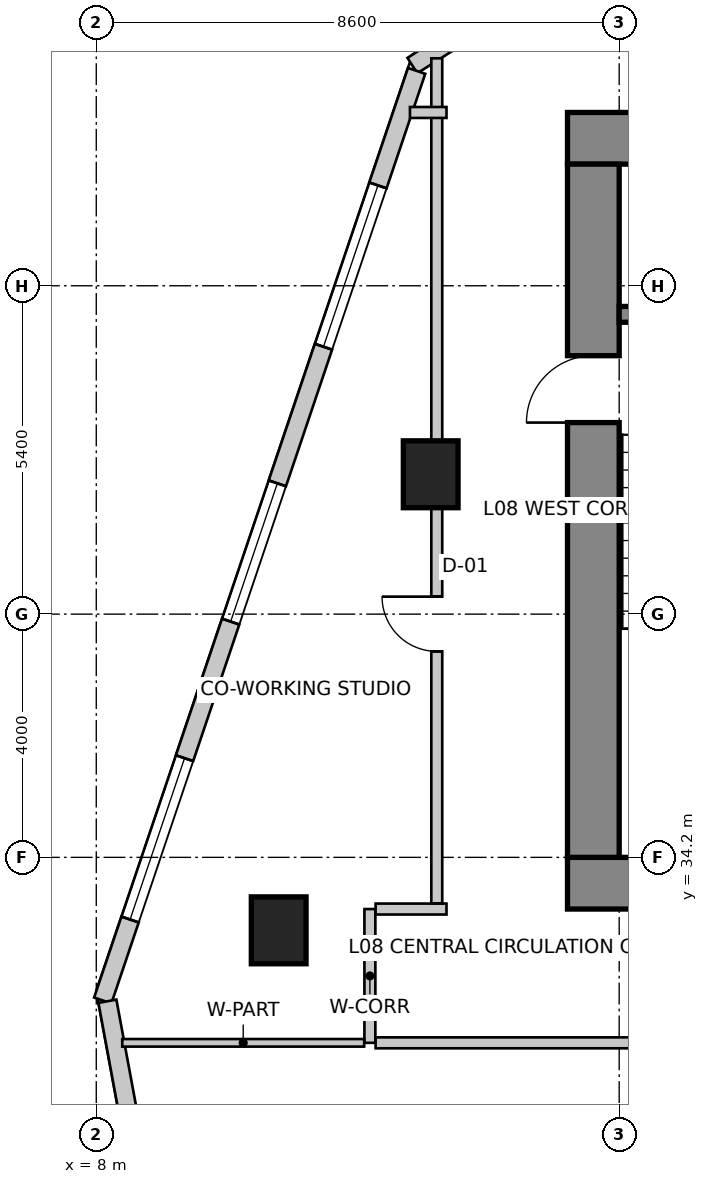
"""IFC4 building model, lengths in metres.
Left out: names, types, materials, properties, quantities, classifications, styles, units other than length and angle.
Written with IfcOpenShell. Run it as: python <this file> out.ifc"""

import sys

from ifc_helpers import new_model, si_unit, direction, frame, frame_2d, origin, origin_2d, place, context, subcontext, project, spatial, rectangle, extrude, source, transform, mapped, element, fill, save


model = new_model("IFC4")
c1 = context("Model", 3, precision=1e-05, world=origin(), true_north=direction((0.0, 1.0)))
c2 = subcontext(c1, "Body", "Model", "MODEL_VIEW")
j1 = project(units=[si_unit("LENGTHUNIT", "METRE"), si_unit("PLANEANGLEUNIT", "RADIAN")], contexts=[c1])
p1 = place(None, origin())
s1 = spatial("IfcSite", under=j1, at=p1, CompositionType="ELEMENT")
p2 = place(p1, origin())
s2 = spatial("IfcBuilding", under=s1, at=p2, CompositionType="ELEMENT")
p3 = place(p2, frame((0.0, 0.0, 35.0)))
s3 = spatial("IfcBuildingStorey", under=s2, at=p3, CompositionType="ELEMENT", Elevation=35.0)
p4 = place(p3, frame((15.75, 46.025, 0.0), z_axis=(0.0, 0.0, 1.0), x_axis=(1.0, 0.0, 0.0)))
e1 = element("IfcWall", 1, at=p4, inside=s3, PredefinedType="SHEAR", context=c2, shape_type="SweptSolid", body=[
    extrude(rectangle(XDim=16.1, YDim=0.85, at=frame_2d((8.05, 0.0))), origin(), (0.0, 0.0, 1.0), 4.0),
])
p5 = place(p3, frame((15.75, 33.775, 0.0), z_axis=(0.0, 0.0, 1.0), x_axis=(1.0, 0.0, 0.0)))
e2 = element("IfcWall", 2, at=p5, inside=s3, PredefinedType="SHEAR", context=c2, shape_type="SweptSolid", body=[
    extrude(rectangle(XDim=16.1, YDim=0.85, at=frame_2d((8.05, 0.0))), origin(), (0.0, 0.0, 1.0), 4.0),
])
m1 = source(origin(), c2, "Body", "SweptSolid", [
    extrude(rectangle(XDim=1.3, YDim=2.15, at=frame_2d((0.65, 1.075))), frame((0.0, 0.435, 0.0), z_axis=(0.0, -1.0, 0.0), x_axis=(1.0, 0.0, 0.0)), (0.0, 0.0, 1.0), 0.87),
])
p6 = place(p5, frame((10.18, 0.0, 0.0)))
e3 = element("IfcOpeningElement", 3, at=p6, cuts=e2, PredefinedType="OPENING", context=c2, shape_type="MappedRepresentation", body=[
    mapped(m1, transform((0.0, 0.0, 0.0), scale=1.0)),
])
p7 = place(p3, frame((16.175, 34.2, 0.0), z_axis=(0.0, 0.0, 1.0), x_axis=(0.0, 1.0, 0.0)))
e4 = element("IfcWall", 4, at=p7, inside=s3, PredefinedType="SHEAR", context=c2, shape_type="SweptSolid", body=[
    extrude(rectangle(XDim=11.4, YDim=0.85, at=frame_2d((5.7, 0.0))), origin(), (0.0, 0.0, 1.0), 4.0),
])
m2 = source(origin(), c2, "Body", "SweptSolid", [
    extrude(rectangle(XDim=1.1, YDim=2.15, at=frame_2d((0.55, 1.075))), frame((0.0, 0.435, 0.0), z_axis=(0.0, -1.0, 0.0), x_axis=(1.0, 0.0, 0.0)), (0.0, 0.0, 1.0), 0.87),
])
p8 = place(p7, frame((7.15, 0.0, 0.0)))
e5 = element("IfcOpeningElement", 5, at=p8, cuts=e4, PredefinedType="OPENING", context=c2, shape_type="MappedRepresentation", body=[
    mapped(m2, transform((0.0, 0.0, 0.0), scale=1.0)),
])
p9 = place(p3, frame((16.6, 43.13, 0.0), z_axis=(0.0, 0.0, 1.0), x_axis=(1.0, 0.0, 0.0)))
e6 = element("IfcWall", 6, at=p9, inside=s3, PredefinedType="SHEAR", context=c2, shape_type="SweptSolid", body=[
    extrude(rectangle(XDim=3.5, YDim=0.26, at=frame_2d((1.75, 0.0))), origin(), (0.0, 0.0, 1.0), 4.0),
])
m3 = source(origin(), c2, "Body", "SweptSolid", [
    extrude(rectangle(XDim=0.9, YDim=1.1, at=origin_2d()), origin(), (0.0, 0.0, 1.0), 4.0),
])
for number, where, z_axis, x_axis in (
    (7, (11.0, 33.0, 0.0), (0.0, 0.0, 1.0), (1.0, 0.0, 0.0)),
    (8, (13.5, 40.5, 0.0), (0.0, 0.0, 1.0), (1.0, 0.0, 0.0)),
):
    element("IfcColumn", number, at=place(p3, frame(where, z_axis=z_axis, x_axis=x_axis)), inside=s3, PredefinedType="COLUMN", context=c2, shape_type="MappedRepresentation", body=[
        mapped(m3, transform((0.0, 0.0, 0.0), scale=1.0)),
    ])
p10 = place(p3, frame((21.875, 52.743, 0.0), z_axis=(0.0, 0.0, 1.0), x_axis=(-0.843647802826, -0.536896996441, 0.0)))
e9 = element("IfcWall", 9, at=p10, inside=s3, PredefinedType="SOLIDWALL", context=c2, shape_type="SweptSolid", body=[
    extrude(rectangle(XDim=10.284, YDim=0.3, at=frame_2d((5.142, 0.0))), origin(), (0.0, 0.0, 1.0), 3.75),
])
m4 = source(origin(), c2, "Body", "SweptSolid", [
    extrude(rectangle(XDim=0.9, YDim=1.6, at=frame_2d((0.45, 0.8))), frame((0.0, 0.16, 0.0), z_axis=(0.0, -1.0, 0.0), x_axis=(1.0, 0.0, 0.0)), (0.0, 0.0, 1.0), 0.32),
])
p11 = place(p10, frame((0.629, 0.0, 0.85)))
e10 = element("IfcOpeningElement", 10, at=p11, cuts=e9, PredefinedType="OPENING", context=c2, shape_type="MappedRepresentation", body=[
    mapped(m4, transform((0.0, 0.0, 0.0), scale=1.0)),
])
m5 = source(origin(), c2, "Body", "SweptSolid", [
    extrude(rectangle(XDim=2.4, YDim=2.2, at=frame_2d((1.2, 1.1))), frame((0.0, 0.16, 0.0), z_axis=(0.0, -1.0, 0.0), x_axis=(1.0, 0.0, 0.0)), (0.0, 0.0, 1.0), 0.32),
])
p12 = place(p10, frame((3.542, 0.0, 0.85)))
e11 = element("IfcOpeningElement", 11, at=p12, cuts=e9, PredefinedType="OPENING", context=c2, shape_type="MappedRepresentation", body=[
    mapped(m5, transform((0.0, 0.0, 0.0), scale=1.0)),
])
m6 = source(origin(), c2, "Body", "SweptSolid", [
    extrude(rectangle(XDim=1.5, YDim=1.8, at=frame_2d((0.75, 0.9))), frame((0.0, 0.16, 0.0), z_axis=(0.0, -1.0, 0.0), x_axis=(1.0, 0.0, 0.0)), (0.0, 0.0, 1.0), 0.32),
])
p13 = place(p10, frame((7.904, 0.0, 0.85)))
e12 = element("IfcOpeningElement", 12, at=p13, cuts=e9, PredefinedType="OPENING", context=c2, shape_type="MappedRepresentation", body=[
    mapped(m6, transform((0.0, 0.0, 0.0), scale=1.0)),
])
p14 = place(p3, frame((13.269, 47.134, 0.0), z_axis=(0.0, 0.0, 1.0), x_axis=(-0.319920423265, -0.947444416722, 0.0)))
e13 = element("IfcWall", 13, at=p14, inside=s3, PredefinedType="SOLIDWALL", context=c2, shape_type="SweptSolid", body=[
    extrude(rectangle(XDim=16.135, YDim=0.3, at=frame_2d((8.067, 0.0))), origin(), (0.0, 0.0, 1.0), 3.75),
])
m7 = source(origin(), c2, "Body", "SweptSolid", [
    extrude(rectangle(XDim=2.8, YDim=2.4, at=frame_2d((1.4, 1.2))), frame((0.0, 0.16, 0.0), z_axis=(0.0, -1.0, 0.0), x_axis=(1.0, 0.0, 0.0)), (0.0, 0.0, 1.0), 0.32),
])
p15 = place(p14, frame((1.988, 0.0, 0.85)))
e14 = element("IfcOpeningElement", 14, at=p15, cuts=e13, PredefinedType="OPENING", context=c2, shape_type="MappedRepresentation", body=[
    mapped(m7, transform((0.0, 0.0, 0.0), scale=1.0)),
])
p16 = place(p14, frame((7.159, 0.0, 0.85)))
e15 = element("IfcOpeningElement", 15, at=p16, cuts=e13, PredefinedType="OPENING", context=c2, shape_type="MappedRepresentation", body=[
    mapped(m5, transform((0.0, 0.0, 0.0), scale=1.0)),
])
p17 = place(p14, frame((11.93, 0.0, 0.85)))
e16 = element("IfcOpeningElement", 16, at=p17, cuts=e13, PredefinedType="OPENING", context=c2, shape_type="MappedRepresentation", body=[
    mapped(m7, transform((0.0, 0.0, 0.0), scale=1.0)),
])
p18 = place(p3, frame((8.183, 31.833, 0.0), z_axis=(0.0, 0.0, 1.0), x_axis=(0.18216364648, -0.983268226834, 0.0)))
e17 = element("IfcWall", 17, at=p18, inside=s3, PredefinedType="SOLIDWALL", context=c2, shape_type="SweptSolid", body=[
    extrude(rectangle(XDim=26.678, YDim=0.3, at=frame_2d((13.339, 0.0))), origin(), (0.0, 0.0, 1.0), 3.75),
])
p19 = place(p18, frame((2.401, 0.0, 0.85)))
e18 = element("IfcOpeningElement", 18, at=p19, cuts=e17, PredefinedType="OPENING", context=c2, shape_type="MappedRepresentation", body=[
    mapped(m5, transform((0.0, 0.0, 0.0), scale=1.0)),
])
p20 = place(p18, frame((7.529, 0.0, 0.85)))
e19 = element("IfcOpeningElement", 19, at=p20, cuts=e17, PredefinedType="OPENING", context=c2, shape_type="MappedRepresentation", body=[
    mapped(m7, transform((0.0, 0.0, 0.0), scale=1.0)),
])
p21 = place(p18, frame((13.057, 0.0, 0.85)))
e20 = element("IfcOpeningElement", 20, at=p21, cuts=e17, PredefinedType="OPENING", context=c2, shape_type="MappedRepresentation", body=[
    mapped(m5, transform((0.0, 0.0, 0.0), scale=1.0)),
])
p22 = place(p18, frame((18.411, 0.0, 0.85)))
e21 = element("IfcOpeningElement", 21, at=p22, cuts=e17, PredefinedType="OPENING", context=c2, shape_type="MappedRepresentation", body=[
    mapped(m5, transform((0.0, 0.0, 0.0), scale=1.0)),
])
p23 = place(p18, frame((22.709, 0.0, 0.85)))
e22 = element("IfcOpeningElement", 22, at=p23, cuts=e17, PredefinedType="OPENING", context=c2, shape_type="MappedRepresentation", body=[
    mapped(m7, transform((0.0, 0.0, 0.0), scale=1.0)),
])
p24 = place(p3, frame((12.5, 31.15, 0.0), z_axis=(0.0, 0.0, 1.0), x_axis=(0.0, 1.0, 0.0)))
e23 = element("IfcWall", 23, at=p24, inside=s3, PredefinedType="PARTITIONING", context=c2, shape_type="SweptSolid", body=[
    extrude(rectangle(XDim=2.2, YDim=0.18, at=frame_2d((1.1, 0.0))), origin(), (0.0, 0.0, 1.0), 3.434),
])
p25 = place(p3, frame((12.594, 33.35, 0.0), z_axis=(0.0, 0.0, 1.0), x_axis=(1.0, 0.0, 0.0)))
e24 = element("IfcWall", 24, at=p25, inside=s3, PredefinedType="PARTITIONING", context=c2, shape_type="SweptSolid", body=[
    extrude(rectangle(XDim=1.166, YDim=0.18, at=frame_2d((0.583, 0.0))), origin(), (0.0, 0.0, 1.0), 3.75),
])
p26 = place(p3, frame((26.76, 31.15, 0.0), z_axis=(0.0, 0.0, 1.0), x_axis=(-1.0, 0.0, 0.0)))
e25 = element("IfcWall", 25, at=p26, inside=s3, PredefinedType="PARTITIONING", context=c2, shape_type="SweptSolid", body=[
    extrude(rectangle(XDim=14.166, YDim=0.18, at=frame_2d((7.083, 0.0))), origin(), (0.0, 0.0, 1.0), 3.434),
])
m8 = source(origin(), c2, "Body", "SweptSolid", [
    extrude(rectangle(XDim=1.4, YDim=2.15, at=frame_2d((0.7, 1.075))), frame((0.0, 0.1, 0.0), z_axis=(0.0, -1.0, 0.0), x_axis=(1.0, 0.0, 0.0)), (0.0, 0.0, 1.0), 0.2),
])
p27 = place(p26, frame((6.323, 0.0, 0.0)))
e26 = element("IfcOpeningElement", 26, at=p27, cuts=e25, PredefinedType="OPENING", context=c2, shape_type="MappedRepresentation", body=[
    mapped(m8, transform((0.0, 0.0, 0.0), scale=1.0)),
])
p28 = place(p3, frame((13.6, 33.444, 0.0), z_axis=(0.0, 0.0, 1.0), x_axis=(0.0, 1.0, 0.0)))
e27 = element("IfcWall", 27, at=p28, inside=s3, PredefinedType="PARTITIONING", context=c2, shape_type="SweptSolid", body=[
    extrude(rectangle(XDim=13.896, YDim=0.18, at=frame_2d((6.948, 0.0))), origin(), (0.0, 0.0, 1.0), 2.892),
])
m9 = source(origin(), c2, "Body", "SweptSolid", [
    extrude(rectangle(XDim=0.9, YDim=2.15, at=frame_2d((0.45, 1.075))), frame((0.0, 0.1, 0.0), z_axis=(0.0, -1.0, 0.0), x_axis=(1.0, 0.0, 0.0)), (0.0, 0.0, 1.0), 0.2),
])
p29 = place(p28, frame((4.144, 0.0, 0.0)))
e28 = element("IfcOpeningElement", 28, at=p29, cuts=e27, PredefinedType="OPENING", context=c2, shape_type="MappedRepresentation", body=[
    mapped(m9, transform((0.0, 0.0, 0.0), scale=1.0)),
])
p30 = place(p3, frame((13.76, 46.45, 0.0), z_axis=(0.0, 0.0, 1.0), x_axis=(-1.0, 0.0, 0.0)))
e29 = element("IfcWall", 29, at=p30, inside=s3, PredefinedType="PARTITIONING", context=c2, shape_type="SweptSolid", body=[
    extrude(rectangle(XDim=0.601, YDim=0.18, at=frame_2d((0.301, 0.0))), origin(), (0.0, 0.0, 1.0), 3.75),
])
p31 = place(p3, frame((12.406, 31.15, 0.0), z_axis=(0.0, 0.0, 1.0), x_axis=(-1.0, 0.0, 0.0)))
e30 = element("IfcWall", 30, at=p31, inside=s3, PredefinedType="PARTITIONING", context=c2, shape_type="SweptSolid", body=[
    extrude(rectangle(XDim=3.979, YDim=0.125, at=frame_2d((1.99, 0.0))), origin(), (0.0, 0.0, 1.0), 2.892),
])
m10 = source(origin(), c2, "Body", "SweptSolid", [
    extrude(rectangle(XDim=2.8, YDim=2.4, at=frame_2d((1.4, 1.2))), frame((0.0, -0.015, 0.0), z_axis=(0.0, -1.0, 0.0), x_axis=(1.0, 0.0, 0.0)), (0.0, 0.0, 1.0), 0.06),
])
p32 = place(p15, origin())
e31 = element("IfcWindow", 31, at=p32, inside=s3, PartitioningType="SINGLE_PANEL", PredefinedType="WINDOW", context=c2, shape_type="MappedRepresentation", body=[
    mapped(m10, transform((0.0, 0.0, 0.0), scale=1.0)),
])
fill(e14, e31)
m11 = source(origin(), c2, "Body", "SweptSolid", [
    extrude(rectangle(XDim=2.4, YDim=2.2, at=frame_2d((1.2, 1.1))), frame((0.0, -0.015, 0.0), z_axis=(0.0, -1.0, 0.0), x_axis=(1.0, 0.0, 0.0)), (0.0, 0.0, 1.0), 0.06),
])
p33 = place(p16, origin())
e32 = element("IfcWindow", 32, at=p33, inside=s3, PartitioningType="SINGLE_PANEL", PredefinedType="WINDOW", context=c2, shape_type="MappedRepresentation", body=[
    mapped(m11, transform((0.0, 0.0, 0.0), scale=1.0)),
])
fill(e15, e32)
p34 = place(p17, origin())
e33 = element("IfcWindow", 33, at=p34, inside=s3, PartitioningType="SINGLE_PANEL", PredefinedType="WINDOW", context=c2, shape_type="MappedRepresentation", body=[
    mapped(m10, transform((0.0, 0.0, 0.0), scale=1.0)),
])
fill(e16, e33)
m12 = source(origin(), c2, "Body", "SweptSolid", [
    extrude(rectangle(XDim=1.1, YDim=2.15, at=frame_2d((0.55, 1.075))), frame((0.0, 0.025, 0.0), z_axis=(0.0, -1.0, 0.0), x_axis=(1.0, 0.0, 0.0)), (0.0, 0.0, 1.0), 0.05),
])
p35 = place(p8, origin())
e34 = element("IfcDoor", 34, at=p35, inside=s3, OperationType="SINGLE_SWING_LEFT", PredefinedType="DOOR", context=c2, shape_type="MappedRepresentation", body=[
    mapped(m12, transform((0.0, 0.0, 0.0), scale=1.0)),
])
fill(e5, e34)
m13 = source(origin(), c2, "Body", "SweptSolid", [
    extrude(rectangle(XDim=0.9, YDim=2.15, at=frame_2d((0.45, 1.075))), frame((0.0, 0.025, 0.0), z_axis=(0.0, -1.0, 0.0), x_axis=(1.0, 0.0, 0.0)), (0.0, 0.0, 1.0), 0.05),
])
p36 = place(p29, origin())
e35 = element("IfcDoor", 35, at=p36, inside=s3, OperationType="SINGLE_SWING_RIGHT", PredefinedType="DOOR", context=c2, shape_type="MappedRepresentation", body=[
    mapped(m13, transform((0.0, 0.0, 0.0), scale=1.0)),
])
fill(e28, e35)
save(model, sys.argv[1])
